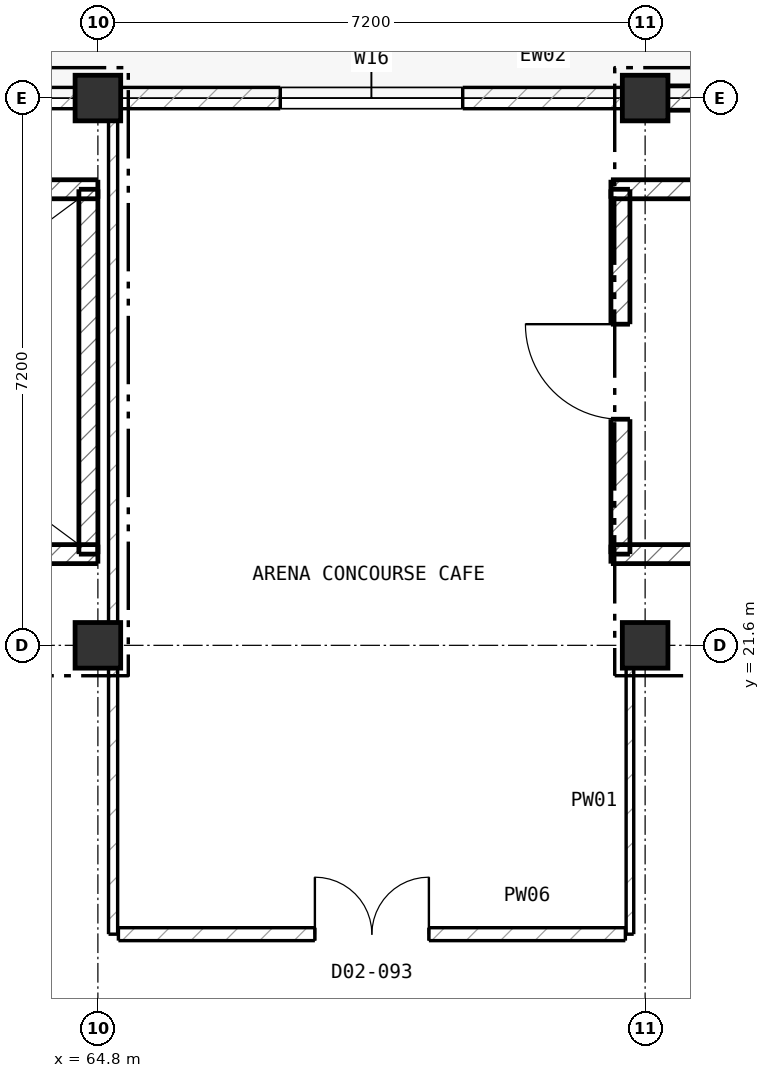
"""IFC4 building model, lengths in metres.
Left out: names, types, materials, properties, quantities, classifications, styles, units other than length and angle.
Written with IfcOpenShell. Run it as: python <this file> out.ifc"""

import sys

from ifc_helpers import new_model, si_unit, direction, frame, frame_2d, origin, origin_2d, place, context, subcontext, project, spatial, rectangle, extrude, element, fill, save


model = new_model("IFC4")
c1 = context("Model", 3, precision=1e-05, world=origin(), true_north=direction((0.0, 1.0)))
c2 = subcontext(c1, "Body", "Model", "MODEL_VIEW")
j1 = project(units=[si_unit("LENGTHUNIT", "METRE"), si_unit("PLANEANGLEUNIT", "RADIAN")], contexts=[c1])
p1 = place(None, origin())
s1 = spatial("IfcSite", under=j1, at=p1, CompositionType="ELEMENT")
p2 = place(p1, origin())
s2 = spatial("IfcBuilding", under=s1, at=p2, CompositionType="ELEMENT")
p3 = place(p2, frame((0.0, 0.0, 11.2)))
s3 = spatial("IfcBuildingStorey", under=s2, at=p3, CompositionType="ELEMENT", Elevation=11.2)
for number, where, z_axis, x_axis in (
    (1, (64.8, 21.6, 0.0), (0.0, 0.0, 1.0), (1.0, 0.0, 0.0)),
    (2, (64.8, 28.8, 0.0), (0.0, 0.0, 1.0), (1.0, 0.0, 0.0)),
    (3, (72.0, 21.6, 0.0), (0.0, 0.0, 1.0), (1.0, 0.0, 0.0)),
    (4, (72.0, 28.8, 0.0), (0.0, 0.0, 1.0), (1.0, 0.0, 0.0)),
):
    element("IfcColumn", number, at=place(p3, frame(where, z_axis=z_axis, x_axis=x_axis)), inside=s3, PredefinedType="COLUMN", context=c2, shape_type="SweptSolid", body=[
        extrude(rectangle(XDim=0.6, YDim=0.6, at=origin_2d()), origin(), (0.0, 0.0, 1.0), 4.8),
    ])
p4 = place(p3, frame((57.885, 28.8, 0.0), z_axis=(0.0, 0.0, 1.0), x_axis=(1.0, 0.0, 0.0)))
e5 = element("IfcWall", 5, at=p4, inside=s3, PredefinedType="SOLIDWALL", context=c2, shape_type="SweptSolid", body=[
    extrude(rectangle(XDim=6.63, YDim=0.28, at=frame_2d((3.315, 0.0))), origin(), (0.0, 0.0, 1.0), 4.185),
])
p5 = place(p4, frame((2.315, 0.0, 0.0)))
e6 = element("IfcOpeningElement", 6, at=p5, cuts=e5, PredefinedType="OPENING", context=c2, shape_type="SweptSolid", body=[
    extrude(rectangle(XDim=2.0, YDim=2.4, at=frame_2d((1.0, 1.2))), frame((0.0, 0.15, 0.0), z_axis=(0.0, -1.0, 0.0), x_axis=(1.0, 0.0, 0.0)), (0.0, 0.0, 1.0), 0.3),
])
p6 = place(p3, frame((65.085, 28.8, 0.0), z_axis=(0.0, 0.0, 1.0), x_axis=(1.0, 0.0, 0.0)))
e7 = element("IfcWall", 7, at=p6, inside=s3, PredefinedType="SOLIDWALL", context=c2, shape_type="SweptSolid", body=[
    extrude(rectangle(XDim=6.63, YDim=0.28, at=frame_2d((3.315, 0.0))), origin(), (0.0, 0.0, 1.0), 4.185),
])
p7 = place(p6, frame((2.115, 0.0, 0.9)))
e8 = element("IfcOpeningElement", 8, at=p7, cuts=e7, PredefinedType="OPENING", context=c2, shape_type="SweptSolid", body=[
    extrude(rectangle(XDim=2.4, YDim=2.1, at=frame_2d((1.2, 1.05))), frame((0.0, 0.15, 0.0), z_axis=(0.0, -1.0, 0.0), x_axis=(1.0, 0.0, 0.0)), (0.0, 0.0, 1.0), 0.3),
])
p8 = place(p3, frame((72.285, 28.8, 0.0), z_axis=(0.0, 0.0, 1.0), x_axis=(1.0, 0.0, 0.0)))
e9 = element("IfcWall", 9, at=p8, inside=s3, PredefinedType="SOLIDWALL", context=c2, shape_type="SweptSolid", body=[
    extrude(rectangle(XDim=6.63, YDim=0.32, at=frame_2d((3.315, 0.0))), origin(), (0.0, 0.0, 1.0), 4.8),
])
p9 = place(p3, frame((57.15, 27.6, 0.0), z_axis=(0.0, 0.0, 1.0), x_axis=(1.0, 0.0, 0.0)))
e10 = element("IfcWall", 10, at=p9, inside=s3, PredefinedType="SHEAR", context=c2, shape_type="SweptSolid", body=[
    extrude(rectangle(XDim=7.65, YDim=0.25, at=frame_2d((3.825, 0.0))), origin(), (0.0, 0.0, 1.0), 4.8),
])
p10 = place(p3, frame((64.675, 27.6, 0.0), z_axis=(0.0, 0.0, 1.0), x_axis=(0.0, -1.0, 0.0)))
e11 = element("IfcWall", 11, at=p10, inside=s3, PredefinedType="SHEAR", context=c2, shape_type="SweptSolid", body=[
    extrude(rectangle(XDim=4.8, YDim=0.25, at=frame_2d((2.4, 0.0))), origin(), (0.0, 0.0, 1.0), 4.8),
])
p11 = place(p3, frame((64.8, 22.8, 0.0), z_axis=(0.0, 0.0, 1.0), x_axis=(-1.0, 0.0, 0.0)))
e12 = element("IfcWall", 12, at=p11, inside=s3, PredefinedType="SHEAR", context=c2, shape_type="SweptSolid", body=[
    extrude(rectangle(XDim=7.65, YDim=0.25, at=frame_2d((3.825, 0.0))), origin(), (0.0, 0.0, 1.0), 4.8),
])
p12 = place(p3, frame((71.675, 22.8, 0.0), z_axis=(0.0, 0.0, 1.0), x_axis=(0.0, 1.0, 0.0)))
e13 = element("IfcWall", 13, at=p12, inside=s3, PredefinedType="SHEAR", context=c2, shape_type="SweptSolid", body=[
    extrude(rectangle(XDim=4.8, YDim=0.25, at=frame_2d((2.4, 0.0))), origin(), (0.0, 0.0, 1.0), 4.8),
])
p13 = place(p12, frame((1.775, 0.0, 0.0)))
e14 = element("IfcOpeningElement", 14, at=p13, cuts=e13, PredefinedType="OPENING", context=c2, shape_type="SweptSolid", body=[
    extrude(rectangle(XDim=1.25, YDim=2.2, at=frame_2d((0.625, 1.1))), frame((0.0, 0.135, 0.0), z_axis=(0.0, -1.0, 0.0), x_axis=(1.0, 0.0, 0.0)), (0.0, 0.0, 1.0), 0.27),
])
for number, where, z_axis, x_axis in (
    (15, (71.55, 27.6, 0.0), (0.0, 0.0, 1.0), (1.0, 0.0, 0.0)),
    (16, (79.2, 22.8, 0.0), (0.0, 0.0, 1.0), (-1.0, 0.0, 0.0)),
):
    element("IfcWall", number, at=place(p3, frame(where, z_axis=z_axis, x_axis=x_axis)), inside=s3, PredefinedType="SHEAR", context=c2, shape_type="SweptSolid", body=[
        extrude(rectangle(XDim=7.65, YDim=0.25, at=frame_2d((3.825, 0.0))), origin(), (0.0, 0.0, 1.0), 4.8),
    ])
p14 = place(p3, frame((65.0, 17.8, 0.0), z_axis=(0.0, 0.0, 1.0), x_axis=(0.0, 1.0, 0.0)))
e17 = element("IfcWall", 17, at=p14, inside=s3, PredefinedType="PARTITIONING", context=c2, shape_type="SweptSolid", body=[
    extrude(rectangle(XDim=3.5, YDim=0.12, at=frame_2d((1.75, 0.0))), origin(), (0.0, 0.0, 1.0), 4.51),
])
p15 = place(p3, frame((65.0, 21.9, 0.0), z_axis=(0.0, 0.0, 1.0), x_axis=(0.0, 1.0, 0.0)))
e18 = element("IfcWall", 18, at=p15, inside=s3, PredefinedType="PARTITIONING", context=c2, shape_type="SweptSolid", body=[
    extrude(rectangle(XDim=6.6, YDim=0.12, at=frame_2d((3.3, 0.0))), origin(), (0.0, 0.0, 1.0), 4.51),
])
p16 = place(p3, frame((71.8, 17.8, 0.0), z_axis=(0.0, 0.0, 1.0), x_axis=(0.0, 1.0, 0.0)))
e19 = element("IfcWall", 19, at=p16, inside=s3, PredefinedType="PARTITIONING", context=c2, shape_type="SweptSolid", body=[
    extrude(rectangle(XDim=3.5, YDim=0.1, at=frame_2d((1.75, 0.0))), origin(), (0.0, 0.0, 1.0), 4.51),
])
p17 = place(p3, frame((65.07, 17.8, 0.0), z_axis=(0.0, 0.0, 1.0), x_axis=(1.0, 0.0, 0.0)))
e20 = element("IfcWall", 20, at=p17, inside=s3, PredefinedType="PARTITIONING", context=c2, shape_type="SweptSolid", body=[
    extrude(rectangle(XDim=6.67, YDim=0.17, at=frame_2d((3.335, 0.0))), origin(), (0.0, 0.0, 1.0), 4.51),
])
p18 = place(p17, frame((2.585, 0.0, 0.0)))
e21 = element("IfcOpeningElement", 21, at=p18, cuts=e20, PredefinedType="OPENING", context=c2, shape_type="SweptSolid", body=[
    extrude(rectangle(XDim=1.5, YDim=2.2, at=frame_2d((0.75, 1.1))), frame((0.0, 0.095, 0.0), z_axis=(0.0, -1.0, 0.0), x_axis=(1.0, 0.0, 0.0)), (0.0, 0.0, 1.0), 0.19),
])
p19 = place(p7, origin())
e22 = element("IfcWindow", 22, at=p19, inside=s3, PartitioningType="SINGLE_PANEL", PredefinedType="WINDOW", context=c2, shape_type="SweptSolid", body=[
    extrude(rectangle(XDim=2.4, YDim=2.1, at=frame_2d((1.2, 1.05))), frame((0.0, 0.03, 0.0), z_axis=(0.0, -1.0, 0.0), x_axis=(1.0, 0.0, 0.0)), (0.0, 0.0, 1.0), 0.06),
])
fill(e8, e22)
p20 = place(p13, origin())
e23 = element("IfcDoor", 23, at=p20, inside=s3, OperationType="SINGLE_SWING_RIGHT", PredefinedType="DOOR", context=c2, shape_type="SweptSolid", body=[
    extrude(rectangle(XDim=1.25, YDim=2.2, at=frame_2d((0.625, 1.1))), frame((0.0, 0.025, 0.0), z_axis=(0.0, -1.0, 0.0), x_axis=(1.0, 0.0, 0.0)), (0.0, 0.0, 1.0), 0.05),
])
fill(e14, e23)
p21 = place(p18, origin())
e24 = element("IfcDoor", 24, at=p21, inside=s3, OperationType="DOUBLE_DOOR_SINGLE_SWING", PredefinedType="DOOR", context=c2, shape_type="SweptSolid", body=[
    extrude(rectangle(XDim=1.5, YDim=2.2, at=frame_2d((0.75, 1.1))), frame((0.0, 0.025, 0.0), z_axis=(0.0, -1.0, 0.0), x_axis=(1.0, 0.0, 0.0)), (0.0, 0.0, 1.0), 0.05),
])
fill(e21, e24)
save(model, sys.argv[1])
